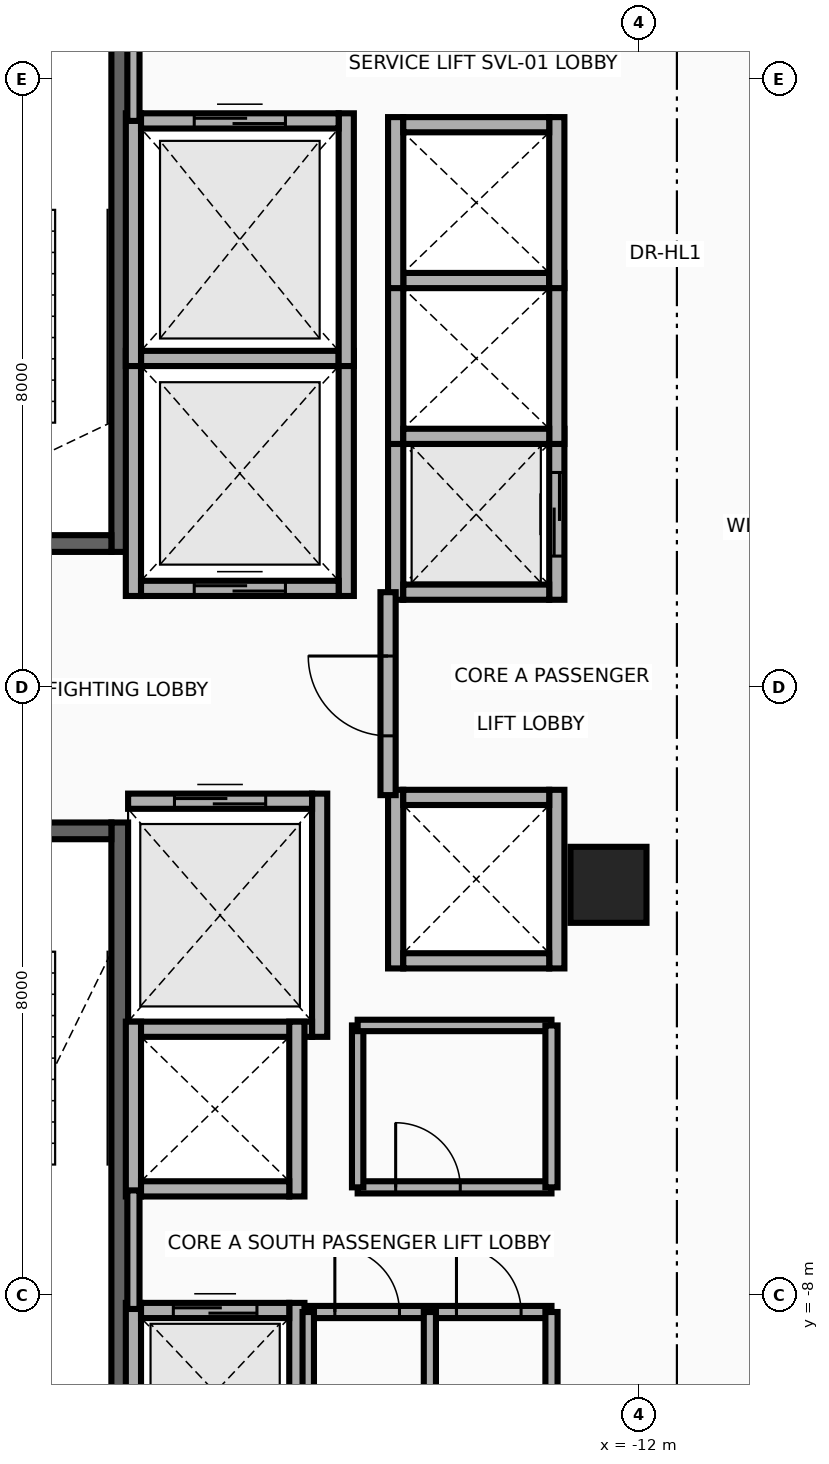
"""IFC4 building model, lengths in metres.
Left out: names, types, materials, properties, quantities, classifications, styles, units other than length and angle.
Written with IfcOpenShell. Run it as: python <this file> out.ifc"""

import sys

from ifc_helpers import new_model, si_unit, direction, frame, frame_2d, origin, origin_2d, place, context, subcontext, project, spatial, rectangle, extrude, source, transform, mapped, element, fill, save


model = new_model("IFC4")
c1 = context("Model", 3, precision=1e-05, world=origin(), true_north=direction((0.0, 1.0)))
c2 = subcontext(c1, "Body", "Model", "MODEL_VIEW")
j1 = project(units=[si_unit("LENGTHUNIT", "METRE"), si_unit("PLANEANGLEUNIT", "RADIAN")], contexts=[c1])
p1 = place(None, origin())
s1 = spatial("IfcSite", under=j1, at=p1, CompositionType="ELEMENT")
p2 = place(p1, origin())
s2 = spatial("IfcBuilding", under=s1, at=p2, CompositionType="ELEMENT")
p3 = place(p2, frame((0.0, 0.0, 176.55)))
s3 = spatial("IfcBuildingStorey", under=s2, at=p3, CompositionType="ELEMENT", Elevation=176.55)
p4 = place(p3, frame((-18.83, 1.78, 0.0), z_axis=(0.0, 0.0, 1.0), x_axis=(0.0, 1.0, 0.0)))
e1 = element("IfcWall", 1, at=p4, inside=s3, PredefinedType="SHEAR", context=c2, shape_type="SweptSolid", body=[
    extrude(rectangle(XDim=8.745, YDim=0.22, at=frame_2d((4.373, 0.0))), origin(), (0.0, 0.0, 1.0), 3.63),
])
p5 = place(p3, frame((-22.05, 1.89, 0.0), z_axis=(0.0, 0.0, 1.0), x_axis=(1.0, 0.0, 0.0)))
e2 = element("IfcWall", 2, at=p5, inside=s3, PredefinedType="SHEAR", context=c2, shape_type="SweptSolid", body=[
    extrude(rectangle(XDim=3.11, YDim=0.22, at=frame_2d((1.555, 0.0))), origin(), (0.0, 0.0, 1.0), 3.63),
])
p6 = place(p5, frame((1.0, 0.0, 0.0)))
e3 = element("IfcOpeningElement", 3, at=p6, cuts=e2, PredefinedType="OPENING", context=c2, shape_type="SweptSolid", body=[
    extrude(rectangle(XDim=1.1, YDim=2.15, at=frame_2d((0.55, 1.075))), frame((0.0, 0.125, 0.0), z_axis=(0.0, -1.0, 0.0), x_axis=(1.0, 0.0, 0.0)), (0.0, 0.0, 1.0), 0.25),
])
p7 = place(p3, frame((-18.83, -10.525, 0.0), z_axis=(0.0, 0.0, 1.0), x_axis=(0.0, 1.0, 0.0)))
e4 = element("IfcWall", 4, at=p7, inside=s3, PredefinedType="SHEAR", context=c2, shape_type="SweptSolid", body=[
    extrude(rectangle(XDim=8.745, YDim=0.22, at=frame_2d((4.373, 0.0))), origin(), (0.0, 0.0, 1.0), 3.63),
])
p8 = place(p3, frame((-22.05, -1.89, 0.0), z_axis=(0.0, 0.0, 1.0), x_axis=(1.0, 0.0, 0.0)))
e5 = element("IfcWall", 5, at=p8, inside=s3, PredefinedType="SHEAR", context=c2, shape_type="SweptSolid", body=[
    extrude(rectangle(XDim=3.11, YDim=0.22, at=frame_2d((1.555, 0.0))), origin(), (0.0, 0.0, 1.0), 3.63),
])
p9 = place(p8, frame((1.0, 0.0, 0.0)))
e6 = element("IfcOpeningElement", 6, at=p9, cuts=e5, PredefinedType="OPENING", context=c2, shape_type="SweptSolid", body=[
    extrude(rectangle(XDim=1.1, YDim=2.15, at=frame_2d((0.55, 1.075))), frame((0.0, 0.125, 0.0), z_axis=(0.0, -1.0, 0.0), x_axis=(1.0, 0.0, 0.0)), (0.0, 0.0, 1.0), 0.25),
])
m1 = source(origin(), c2, "Body", "SweptSolid", [
    extrude(rectangle(XDim=1.0, YDim=1.0, at=origin_2d()), origin(), (0.0, 0.0, 1.0), 3.95),
])
p10 = place(p3, frame((-12.4, -2.6, 0.0), z_axis=(0.0, 0.0, 1.0), x_axis=(1.0, 0.0, 0.0)))
e7 = element("IfcColumn", 7, at=p10, inside=s3, PredefinedType="COLUMN", context=c2, shape_type="MappedRepresentation", body=[
    mapped(m1, transform((0.0, 0.0, 0.0), x_axis=(1.0, 0.0, 0.0), y_axis=(0.0, 1.0, 0.0), z_axis=(0.0, 0.0, 1.0), scale=1.0)),
])
for number, where, z_axis, x_axis in (
    (8, (-18.65, 1.2, 0.0), (0.0, 0.0, 1.0), (0.0, 1.0, 0.0)),
    (9, (-15.85, 1.2, 0.0), (0.0, 0.0, 1.0), (0.0, 1.0, 0.0)),
):
    element("IfcWall", number, at=place(p3, frame(where, z_axis=z_axis, x_axis=x_axis)), inside=s3, PredefinedType="MOVABLE", context=c2, shape_type="SweptSolid", body=[
        extrude(rectangle(XDim=3.225, YDim=0.2, at=frame_2d((1.613, 0.0))), origin(), (0.0, 0.0, 1.0), 3.63),
    ])
p11 = place(p3, frame((-18.55, 1.3, 0.0), z_axis=(0.0, 0.0, 1.0), x_axis=(1.0, 0.0, 0.0)))
e10 = element("IfcWall", 10, at=p11, inside=s3, PredefinedType="MOVABLE", context=c2, shape_type="SweptSolid", body=[
    extrude(rectangle(XDim=2.6, YDim=0.2, at=frame_2d((1.3, 0.0))), origin(), (0.0, 0.0, 1.0), 3.63),
])
p12 = place(p11, frame((0.7, 0.0, 0.0)))
e11 = element("IfcOpeningElement", 11, at=p12, cuts=e10, PredefinedType="OPENING", context=c2, shape_type="SweptSolid", body=[
    extrude(rectangle(XDim=1.2, YDim=2.1, at=frame_2d((0.6, 1.05))), frame((0.0, 0.115, 0.0), z_axis=(0.0, -1.0, 0.0), x_axis=(1.0, 0.0, 0.0)), (0.0, 0.0, 1.0), 0.23),
])
p13 = place(p3, frame((-18.55, 4.325, 0.0), z_axis=(0.0, 0.0, 1.0), x_axis=(1.0, 0.0, 0.0)))
e12 = element("IfcWall", 12, at=p13, inside=s3, PredefinedType="MOVABLE", context=c2, shape_type="SweptSolid", body=[
    extrude(rectangle(XDim=2.6, YDim=0.2, at=frame_2d((1.3, 0.0))), origin(), (0.0, 0.0, 1.0), 3.63),
])
p14 = place(p3, frame((-16.2, -4.6, 0.0), z_axis=(0.0, 0.0, 1.0), x_axis=(0.0, 1.0, 0.0)))
e13 = element("IfcWall", 13, at=p14, inside=s3, PredefinedType="MOVABLE", context=c2, shape_type="SweptSolid", body=[
    extrude(rectangle(XDim=3.2, YDim=0.2, at=frame_2d((1.6, 0.0))), origin(), (0.0, 0.0, 1.0), 3.63),
])
p15 = place(p3, frame((-18.72, -4.5, 0.0), z_axis=(0.0, 0.0, 1.0), x_axis=(1.0, 0.0, 0.0)))
e14 = element("IfcWall", 14, at=p15, inside=s3, PredefinedType="MOVABLE", context=c2, shape_type="SweptSolid", body=[
    extrude(rectangle(XDim=2.42, YDim=0.2, at=frame_2d((1.21, 0.0))), origin(), (0.0, 0.0, 1.0), 3.63),
])
p16 = place(p3, frame((-18.72, -1.5, 0.0), z_axis=(0.0, 0.0, 1.0), x_axis=(1.0, 0.0, 0.0)))
e15 = element("IfcWall", 15, at=p16, inside=s3, PredefinedType="MOVABLE", context=c2, shape_type="SweptSolid", body=[
    extrude(rectangle(XDim=2.42, YDim=0.2, at=frame_2d((1.21, 0.0))), origin(), (0.0, 0.0, 1.0), 3.63),
])
p17 = place(p16, frame((0.61, 0.0, 0.0)))
e16 = element("IfcOpeningElement", 16, at=p17, cuts=e15, PredefinedType="OPENING", context=c2, shape_type="SweptSolid", body=[
    extrude(rectangle(XDim=1.2, YDim=2.1, at=frame_2d((0.6, 1.05))), frame((0.0, 0.115, 0.0), z_axis=(0.0, -1.0, 0.0), x_axis=(1.0, 0.0, 0.0)), (0.0, 0.0, 1.0), 0.23),
])
for number, where, z_axis, x_axis in (
    (17, (-18.65, 4.225, 0.0), (0.0, 0.0, 1.0), (0.0, 1.0, 0.0)),
    (18, (-15.85, 4.225, 0.0), (0.0, 0.0, 1.0), (0.0, 1.0, 0.0)),
):
    element("IfcWall", number, at=place(p3, frame(where, z_axis=z_axis, x_axis=x_axis)), inside=s3, PredefinedType="MOVABLE", context=c2, shape_type="SweptSolid", body=[
        extrude(rectangle(XDim=3.325, YDim=0.2, at=frame_2d((1.663, 0.0))), origin(), (0.0, 0.0, 1.0), 3.63),
    ])
p18 = place(p3, frame((-18.55, 7.45, 0.0), z_axis=(0.0, 0.0, 1.0), x_axis=(1.0, 0.0, 0.0)))
e19 = element("IfcWall", 19, at=p18, inside=s3, PredefinedType="MOVABLE", context=c2, shape_type="SweptSolid", body=[
    extrude(rectangle(XDim=2.6, YDim=0.2, at=frame_2d((1.3, 0.0))), origin(), (0.0, 0.0, 1.0), 3.63),
])
p19 = place(p18, frame((0.7, 0.0, 0.0)))
e20 = element("IfcOpeningElement", 20, at=p19, cuts=e19, PredefinedType="OPENING", context=c2, shape_type="SweptSolid", body=[
    extrude(rectangle(XDim=1.2, YDim=2.1, at=frame_2d((0.6, 1.05))), frame((0.0, 0.115, 0.0), z_axis=(0.0, -1.0, 0.0), x_axis=(1.0, 0.0, 0.0)), (0.0, 0.0, 1.0), 0.23),
])
for number, where, z_axis, x_axis in (
    (21, (-18.65, -10.45, 0.0), (0.0, 0.0, 1.0), (0.0, 1.0, 0.0)),
    (22, (-16.5, -10.45, 0.0), (0.0, 0.0, 1.0), (0.0, 1.0, 0.0)),
):
    element("IfcWall", number, at=place(p3, frame(where, z_axis=z_axis, x_axis=x_axis)), inside=s3, PredefinedType="MOVABLE", context=c2, shape_type="SweptSolid", body=[
        extrude(rectangle(XDim=2.35, YDim=0.2, at=frame_2d((1.175, 0.0))), origin(), (0.0, 0.0, 1.0), 2.665),
    ])
p20 = place(p3, frame((-18.55, -8.2, 0.0), z_axis=(0.0, 0.0, 1.0), x_axis=(1.0, 0.0, 0.0)))
e23 = element("IfcWall", 23, at=p20, inside=s3, PredefinedType="MOVABLE", context=c2, shape_type="SweptSolid", body=[
    extrude(rectangle(XDim=1.95, YDim=0.2, at=frame_2d((0.975, 0.0))), origin(), (0.0, 0.0, 1.0), 3.63),
])
p21 = place(p20, frame((0.425, 0.0, 0.0)))
e24 = element("IfcOpeningElement", 24, at=p21, cuts=e23, PredefinedType="OPENING", context=c2, shape_type="SweptSolid", body=[
    extrude(rectangle(XDim=1.1, YDim=2.1, at=frame_2d((0.55, 1.05))), frame((0.0, 0.115, 0.0), z_axis=(0.0, -1.0, 0.0), x_axis=(1.0, 0.0, 0.0)), (0.0, 0.0, 1.0), 0.23),
])
p22 = place(p3, frame((-15.2, 1.15, 0.0), z_axis=(0.0, 0.0, 1.0), x_axis=(0.0, 1.0, 0.0)))
e25 = element("IfcWall", 25, at=p22, inside=s3, PredefinedType="MOVABLE", context=c2, shape_type="SweptSolid", body=[
    extrude(rectangle(XDim=2.25, YDim=0.2, at=frame_2d((1.125, 0.0))), origin(), (0.0, 0.0, 1.0), 3.63),
])
p23 = place(p3, frame((-13.08, 1.15, 0.0), z_axis=(0.0, 0.0, 1.0), x_axis=(0.0, 1.0, 0.0)))
e26 = element("IfcWall", 26, at=p23, inside=s3, PredefinedType="MOVABLE", context=c2, shape_type="SweptSolid", body=[
    extrude(rectangle(XDim=2.25, YDim=0.2, at=frame_2d((1.125, 0.0))), origin(), (0.0, 0.0, 1.0), 3.63),
])
p24 = place(p23, frame((0.575, 0.0, 0.0)))
e27 = element("IfcOpeningElement", 27, at=p24, cuts=e26, PredefinedType="OPENING", context=c2, shape_type="SweptSolid", body=[
    extrude(rectangle(XDim=1.1, YDim=2.1, at=frame_2d((0.55, 1.05))), frame((0.0, 0.115, 0.0), z_axis=(0.0, -1.0, 0.0), x_axis=(1.0, 0.0, 0.0)), (0.0, 0.0, 1.0), 0.23),
])
p25 = place(p3, frame((-15.1, 1.25, 0.0), z_axis=(0.0, 0.0, 1.0), x_axis=(1.0, 0.0, 0.0)))
e28 = element("IfcWall", 28, at=p25, inside=s3, PredefinedType="MOVABLE", context=c2, shape_type="SweptSolid", body=[
    extrude(rectangle(XDim=1.92, YDim=0.2, at=frame_2d((0.96, 0.0))), origin(), (0.0, 0.0, 1.0), 3.63),
])
for number, where, z_axis, x_axis in (
    (29, (-15.2, 3.2, 0.0), (0.0, 0.0, 1.0), (0.0, 1.0, 0.0)),
    (30, (-13.08, 3.2, 0.0), (0.0, 0.0, 1.0), (0.0, 1.0, 0.0)),
):
    element("IfcWall", number, at=place(p3, frame(where, z_axis=z_axis, x_axis=x_axis)), inside=s3, PredefinedType="MOVABLE", context=c2, shape_type="SweptSolid", body=[
        extrude(rectangle(XDim=2.25, YDim=0.2, at=frame_2d((1.125, 0.0))), origin(), (0.0, 0.0, 1.0), 3.63),
    ])
for number, where, z_axis, x_axis in (
    (31, (-15.1, 3.3, 0.0), (0.0, 0.0, 1.0), (1.0, 0.0, 0.0)),
    (32, (-15.1, 5.35, 0.0), (0.0, 0.0, 1.0), (1.0, 0.0, 0.0)),
):
    element("IfcWall", number, at=place(p3, frame(where, z_axis=z_axis, x_axis=x_axis)), inside=s3, PredefinedType="MOVABLE", context=c2, shape_type="SweptSolid", body=[
        extrude(rectangle(XDim=1.92, YDim=0.2, at=frame_2d((0.96, 0.0))), origin(), (0.0, 0.0, 1.0), 3.63),
    ])
for number, where, z_axis, x_axis in (
    (33, (-15.2, 5.25, 0.0), (0.0, 0.0, 1.0), (0.0, 1.0, 0.0)),
    (34, (-13.08, 5.25, 0.0), (0.0, 0.0, 1.0), (0.0, 1.0, 0.0)),
):
    element("IfcWall", number, at=place(p3, frame(where, z_axis=z_axis, x_axis=x_axis)), inside=s3, PredefinedType="MOVABLE", context=c2, shape_type="SweptSolid", body=[
        extrude(rectangle(XDim=2.25, YDim=0.2, at=frame_2d((1.125, 0.0))), origin(), (0.0, 0.0, 1.0), 3.63),
    ])
p26 = place(p3, frame((-15.1, 7.4, 0.0), z_axis=(0.0, 0.0, 1.0), x_axis=(1.0, 0.0, 0.0)))
e35 = element("IfcWall", 35, at=p26, inside=s3, PredefinedType="MOVABLE", context=c2, shape_type="SweptSolid", body=[
    extrude(rectangle(XDim=1.92, YDim=0.2, at=frame_2d((0.96, 0.0))), origin(), (0.0, 0.0, 1.0), 3.63),
])
for number, where, z_axis, x_axis in (
    (36, (-18.65, -6.7, 0.0), (0.0, 0.0, 1.0), (0.0, 1.0, 0.0)),
    (37, (-16.5, -6.7, 0.0), (0.0, 0.0, 1.0), (0.0, 1.0, 0.0)),
):
    element("IfcWall", number, at=place(p3, frame(where, z_axis=z_axis, x_axis=x_axis)), inside=s3, PredefinedType="MOVABLE", context=c2, shape_type="SweptSolid", body=[
        extrude(rectangle(XDim=2.3, YDim=0.2, at=frame_2d((1.15, 0.0))), origin(), (0.0, 0.0, 1.0), 3.63),
    ])
p27 = place(p3, frame((-18.55, -6.6, 0.0), z_axis=(0.0, 0.0, 1.0), x_axis=(1.0, 0.0, 0.0)))
e38 = element("IfcWall", 38, at=p27, inside=s3, PredefinedType="MOVABLE", context=c2, shape_type="SweptSolid", body=[
    extrude(rectangle(XDim=1.95, YDim=0.2, at=frame_2d((0.975, 0.0))), origin(), (0.0, 0.0, 1.0), 3.63),
])
for number, where, z_axis, x_axis in (
    (39, (-15.2, -3.7, 0.0), (0.0, 0.0, 1.0), (0.0, 1.0, 0.0)),
    (40, (-13.08, -3.7, 0.0), (0.0, 0.0, 1.0), (0.0, 1.0, 0.0)),
):
    element("IfcWall", number, at=place(p3, frame(where, z_axis=z_axis, x_axis=x_axis)), inside=s3, PredefinedType="MOVABLE", context=c2, shape_type="SweptSolid", body=[
        extrude(rectangle(XDim=2.35, YDim=0.2, at=frame_2d((1.175, 0.0))), origin(), (0.0, 0.0, 1.0), 3.63),
    ])
for number, where, z_axis, x_axis in (
    (41, (-15.1, -3.6, 0.0), (0.0, 0.0, 1.0), (1.0, 0.0, 0.0)),
    (42, (-15.1, -1.45, 0.0), (0.0, 0.0, 1.0), (1.0, 0.0, 0.0)),
):
    element("IfcWall", number, at=place(p3, frame(where, z_axis=z_axis, x_axis=x_axis)), inside=s3, PredefinedType="MOVABLE", context=c2, shape_type="SweptSolid", body=[
        extrude(rectangle(XDim=1.92, YDim=0.2, at=frame_2d((0.96, 0.0))), origin(), (0.0, 0.0, 1.0), 3.63),
    ])
p28 = place(p3, frame((-15.3, -1.42, 0.0), z_axis=(0.0, 0.0, 1.0), x_axis=(0.0, 1.0, 0.0)))
e43 = element("IfcWall", 43, at=p28, inside=s3, PredefinedType="PARTITIONING", context=c2, shape_type="SweptSolid", body=[
    extrude(rectangle(XDim=2.67, YDim=0.2, at=frame_2d((1.335, 0.0))), origin(), (0.0, 0.0, 1.0), 3.63),
])
p29 = place(p28, frame((0.78, 0.0, 0.0)))
e44 = element("IfcOpeningElement", 44, at=p29, cuts=e43, PredefinedType="OPENING", context=c2, shape_type="SweptSolid", body=[
    extrude(rectangle(XDim=1.05, YDim=2.15, at=frame_2d((0.525, 1.075))), frame((0.0, 0.115, 0.0), z_axis=(0.0, -1.0, 0.0), x_axis=(1.0, 0.0, 0.0)), (0.0, 0.0, 1.0), 0.23),
])
p30 = place(p3, frame((-18.65, 7.45, 0.0), z_axis=(0.0, 0.0, 1.0), x_axis=(0.0, 1.0, 0.0)))
e45 = element("IfcWall", 45, at=p30, inside=s3, PredefinedType="PARTITIONING", context=c2, shape_type="SweptSolid", body=[
    extrude(rectangle(XDim=2.93, YDim=0.16, at=frame_2d((1.465, 0.0))), origin(), (0.0, 0.0, 1.0), 3.63),
])
p31 = place(p3, frame((-18.65, -8.18, 0.0), z_axis=(0.0, 0.0, 1.0), x_axis=(0.0, 1.0, 0.0)))
e46 = element("IfcWall", 46, at=p31, inside=s3, PredefinedType="PARTITIONING", context=c2, shape_type="SweptSolid", body=[
    extrude(rectangle(XDim=1.56, YDim=0.16, at=frame_2d((0.78, 0.0))), origin(), (0.0, 0.0, 1.0), 3.63),
])
p32 = place(p3, frame((-16.35, -8.22, 0.0), z_axis=(0.0, 0.0, 1.0), x_axis=(1.0, 0.0, 0.0)))
e47 = element("IfcWall", 47, at=p32, inside=s3, PredefinedType="PARTITIONING", context=c2, shape_type="SweptSolid", body=[
    extrude(rectangle(XDim=3.2, YDim=0.16, at=frame_2d((1.6, 0.0))), origin(), (0.0, 0.0, 1.0), 3.63),
])
p33 = place(p32, frame((0.35, 0.0, 0.0)))
e48 = element("IfcOpeningElement", 48, at=p33, cuts=e47, PredefinedType="OPENING", context=c2, shape_type="SweptSolid", body=[
    extrude(rectangle(XDim=0.85, YDim=2.05, at=frame_2d((0.425, 1.025))), frame((0.0, 0.095, 0.0), z_axis=(0.0, -1.0, 0.0), x_axis=(1.0, 0.0, 0.0)), (0.0, 0.0, 1.0), 0.19),
])
p34 = place(p32, frame((1.95, 0.0, 0.0)))
e49 = element("IfcOpeningElement", 49, at=p34, cuts=e47, PredefinedType="OPENING", context=c2, shape_type="SweptSolid", body=[
    extrude(rectangle(XDim=0.85, YDim=2.05, at=frame_2d((0.425, 1.025))), frame((0.0, 0.095, 0.0), z_axis=(0.0, -1.0, 0.0), x_axis=(1.0, 0.0, 0.0)), (0.0, 0.0, 1.0), 0.19),
])
p35 = place(p3, frame((-16.35, -10.35, 0.0), z_axis=(0.0, 0.0, 1.0), x_axis=(0.0, 1.0, 0.0)))
e50 = element("IfcWall", 50, at=p35, inside=s3, PredefinedType="PARTITIONING", context=c2, shape_type="SweptSolid", body=[
    extrude(rectangle(XDim=2.13, YDim=0.15, at=frame_2d((1.065, 0.0))), origin(), (0.0, 0.0, 1.0), 3.63),
])
for number, where, z_axis, x_axis in (
    (51, (-13.15, -10.35, 0.0), (0.0, 0.0, 1.0), (0.0, 1.0, 0.0)),
    (52, (-14.75, -10.35, 0.0), (0.0, 0.0, 1.0), (0.0, 1.0, 0.0)),
):
    element("IfcWall", number, at=place(p3, frame(where, z_axis=z_axis, x_axis=x_axis)), inside=s3, PredefinedType="PARTITIONING", context=c2, shape_type="SweptSolid", body=[
        extrude(rectangle(XDim=2.13, YDim=0.16, at=frame_2d((1.065, 0.0))), origin(), (0.0, 0.0, 1.0), 3.63),
    ])
p36 = place(p3, frame((-15.7, -6.58, 0.0), z_axis=(0.0, 0.0, 1.0), x_axis=(1.0, 0.0, 0.0)))
e53 = element("IfcWall", 53, at=p36, inside=s3, PredefinedType="PARTITIONING", context=c2, shape_type="SweptSolid", body=[
    extrude(rectangle(XDim=2.55, YDim=0.16, at=frame_2d((1.275, 0.0))), origin(), (0.0, 0.0, 1.0), 3.63),
])
p37 = place(p36, frame((0.5, 0.0, 0.0)))
e54 = element("IfcOpeningElement", 54, at=p37, cuts=e53, PredefinedType="OPENING", context=c2, shape_type="SweptSolid", body=[
    extrude(rectangle(XDim=0.85, YDim=2.05, at=frame_2d((0.425, 1.025))), frame((0.0, 0.095, 0.0), z_axis=(0.0, -1.0, 0.0), x_axis=(1.0, 0.0, 0.0)), (0.0, 0.0, 1.0), 0.19),
])
p38 = place(p3, frame((-15.7, -6.58, 0.0), z_axis=(0.0, 0.0, 1.0), x_axis=(0.0, 1.0, 0.0)))
e55 = element("IfcWall", 55, at=p38, inside=s3, PredefinedType="PARTITIONING", context=c2, shape_type="SweptSolid", body=[
    extrude(rectangle(XDim=2.13, YDim=0.15, at=frame_2d((1.065, 0.0))), origin(), (0.0, 0.0, 1.0), 3.63),
])
p39 = place(p3, frame((-15.7, -4.45, 0.0), z_axis=(0.0, 0.0, 1.0), x_axis=(1.0, 0.0, 0.0)))
e56 = element("IfcWall", 56, at=p39, inside=s3, PredefinedType="PARTITIONING", context=c2, shape_type="SweptSolid", body=[
    extrude(rectangle(XDim=2.55, YDim=0.15, at=frame_2d((1.275, 0.0))), origin(), (0.0, 0.0, 1.0), 3.63),
])
p40 = place(p3, frame((-13.15, -6.58, 0.0), z_axis=(0.0, 0.0, 1.0), x_axis=(0.0, 1.0, 0.0)))
e57 = element("IfcWall", 57, at=p40, inside=s3, PredefinedType="PARTITIONING", context=c2, shape_type="SweptSolid", body=[
    extrude(rectangle(XDim=2.13, YDim=0.16, at=frame_2d((1.065, 0.0))), origin(), (0.0, 0.0, 1.0), 3.63),
])
p41 = place(p12, origin())
e58 = element("IfcDoor", 58, at=p41, inside=s3, OperationType="DOUBLE_DOOR_SLIDING", PredefinedType="DOOR", context=c2, shape_type="SweptSolid", body=[
    extrude(rectangle(XDim=1.2, YDim=2.1, at=frame_2d((0.6, 1.05))), frame((0.0, 0.025, 0.0), z_axis=(0.0, -1.0, 0.0), x_axis=(1.0, 0.0, 0.0)), (0.0, 0.0, 1.0), 0.05),
])
fill(e11, e58)
p42 = place(p17, origin())
e59 = element("IfcDoor", 59, at=p42, inside=s3, OperationType="DOUBLE_DOOR_SLIDING", PredefinedType="DOOR", context=c2, shape_type="SweptSolid", body=[
    extrude(rectangle(XDim=1.2, YDim=2.1, at=frame_2d((0.6, 1.05))), frame((0.0, 0.025, 0.0), z_axis=(0.0, -1.0, 0.0), x_axis=(1.0, 0.0, 0.0)), (0.0, 0.0, 1.0), 0.05),
])
fill(e16, e59)
p43 = place(p19, origin())
e60 = element("IfcDoor", 60, at=p43, inside=s3, OperationType="DOUBLE_DOOR_SLIDING", PredefinedType="DOOR", context=c2, shape_type="SweptSolid", body=[
    extrude(rectangle(XDim=1.2, YDim=2.1, at=frame_2d((0.6, 1.05))), frame((0.0, 0.025, 0.0), z_axis=(0.0, -1.0, 0.0), x_axis=(1.0, 0.0, 0.0)), (0.0, 0.0, 1.0), 0.05),
])
fill(e20, e60)
p44 = place(p21, origin())
e61 = element("IfcDoor", 61, at=p44, inside=s3, OperationType="DOUBLE_DOOR_SLIDING", PredefinedType="DOOR", context=c2, shape_type="SweptSolid", body=[
    extrude(rectangle(XDim=1.1, YDim=2.1, at=frame_2d((0.55, 1.05))), frame((0.0, 0.025, 0.0), z_axis=(0.0, -1.0, 0.0), x_axis=(1.0, 0.0, 0.0)), (0.0, 0.0, 1.0), 0.05),
])
fill(e24, e61)
p45 = place(p24, origin())
e62 = element("IfcDoor", 62, at=p45, inside=s3, OperationType="DOUBLE_DOOR_SLIDING", PredefinedType="DOOR", context=c2, shape_type="SweptSolid", body=[
    extrude(rectangle(XDim=1.1, YDim=2.1, at=frame_2d((0.55, 1.05))), frame((0.0, 0.025, 0.0), z_axis=(0.0, -1.0, 0.0), x_axis=(1.0, 0.0, 0.0)), (0.0, 0.0, 1.0), 0.05),
])
fill(e27, e62)
p46 = place(p29, origin())
e63 = element("IfcDoor", 63, at=p46, inside=s3, OperationType="SINGLE_SWING_RIGHT", PredefinedType="DOOR", context=c2, shape_type="SweptSolid", body=[
    extrude(rectangle(XDim=1.05, YDim=2.15, at=frame_2d((0.525, 1.075))), frame((0.0, 0.025, 0.0), z_axis=(0.0, -1.0, 0.0), x_axis=(1.0, 0.0, 0.0)), (0.0, 0.0, 1.0), 0.05),
])
fill(e44, e63)
p47 = place(p33, origin())
e64 = element("IfcDoor", 64, at=p47, inside=s3, OperationType="SINGLE_SWING_RIGHT", PredefinedType="DOOR", context=c2, shape_type="SweptSolid", body=[
    extrude(rectangle(XDim=0.85, YDim=2.05, at=frame_2d((0.425, 1.025))), frame((0.0, 0.025, 0.0), z_axis=(0.0, -1.0, 0.0), x_axis=(1.0, 0.0, 0.0)), (0.0, 0.0, 1.0), 0.05),
])
fill(e48, e64)
p48 = place(p34, origin())
e65 = element("IfcDoor", 65, at=p48, inside=s3, OperationType="SINGLE_SWING_LEFT", PredefinedType="DOOR", context=c2, shape_type="SweptSolid", body=[
    extrude(rectangle(XDim=0.85, YDim=2.05, at=frame_2d((0.425, 1.025))), frame((0.0, 0.025, 0.0), z_axis=(0.0, -1.0, 0.0), x_axis=(1.0, 0.0, 0.0)), (0.0, 0.0, 1.0), 0.05),
])
fill(e49, e65)
p49 = place(p37, origin())
e66 = element("IfcDoor", 66, at=p49, inside=s3, OperationType="SINGLE_SWING_RIGHT", PredefinedType="DOOR", context=c2, shape_type="SweptSolid", body=[
    extrude(rectangle(XDim=0.85, YDim=2.05, at=frame_2d((0.425, 1.025))), frame((0.0, 0.025, 0.0), z_axis=(0.0, -1.0, 0.0), x_axis=(1.0, 0.0, 0.0)), (0.0, 0.0, 1.0), 0.05),
])
fill(e54, e66)
save(model, sys.argv[1])
